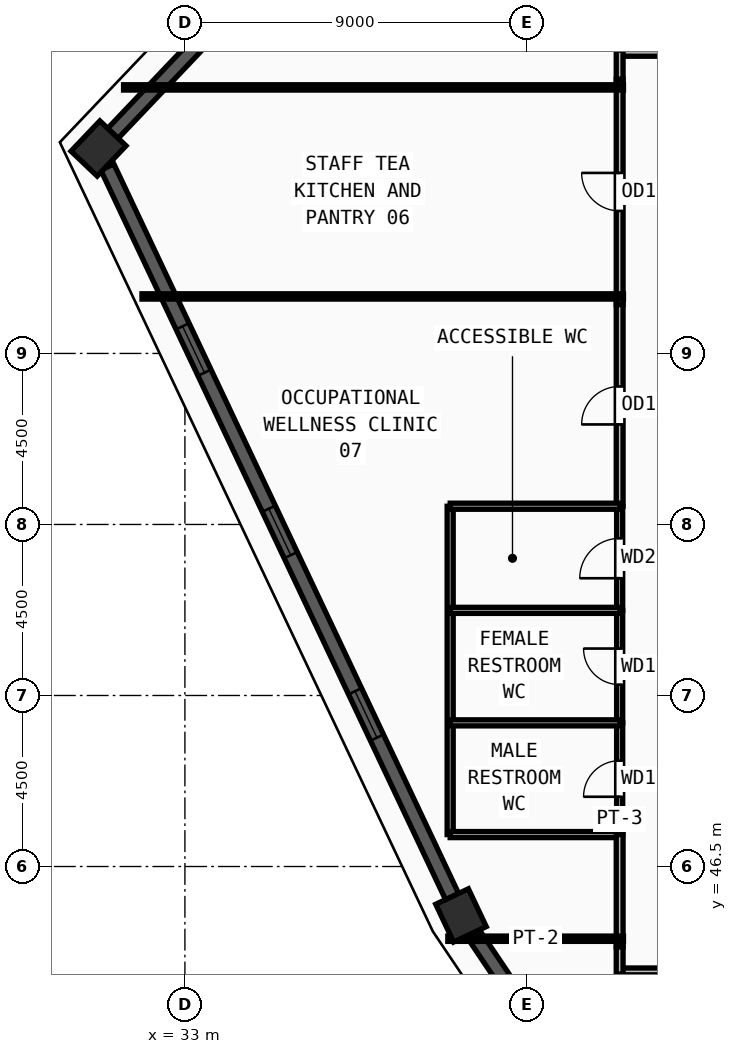
"""IFC4 building model, lengths in metres.
Left out: names, types, materials, properties, quantities, classifications, styles, units other than length and angle.
Written with IfcOpenShell. Run it as: python <this file> out.ifc"""

import sys

from ifc_helpers import new_model, si_unit, direction, frame, frame_2d, origin, origin_2d, place, context, subcontext, project, spatial, rectangle, extrude, source, transform, mapped, element, fill, save


model = new_model("IFC4")
c1 = context("Model", 3, precision=1e-05, world=origin(), true_north=direction((0.0, 1.0)))
c2 = subcontext(c1, "Body", "Model", "MODEL_VIEW")
j1 = project(units=[si_unit("LENGTHUNIT", "METRE"), si_unit("PLANEANGLEUNIT", "RADIAN")], contexts=[c1])
p1 = place(None, origin())
s1 = spatial("IfcSite", under=j1, at=p1, CompositionType="ELEMENT")
p2 = place(p1, origin())
s2 = spatial("IfcBuilding", under=s1, at=p2, CompositionType="ELEMENT")
p3 = place(p2, frame((0.0, 0.0, 328.5)))
s3 = spatial("IfcBuildingStorey", under=s2, at=p3, CompositionType="ELEMENT", Elevation=328.5)
m1 = source(origin(), c2, "Body", "SweptSolid", [
    extrude(rectangle(XDim=1.1, YDim=0.95, at=origin_2d()), origin(), (0.0, 0.0, 1.0), 3.75),
])
for number, where, z_axis, x_axis in (
    (1, (40.265, 45.213, 0.0), (0.0, 0.0, 1.0), (-0.427, 0.904, 0.0)),
    (2, (30.727, 65.393, 0.0), (0.0, 0.0, 1.0), (0.689, 0.724, 0.0)),
):
    element("IfcColumn", number, at=place(p3, frame(where, z_axis=z_axis, x_axis=x_axis)), inside=s3, PredefinedType="COLUMN", context=c2, shape_type="MappedRepresentation", body=[
        mapped(m1, transform((0.0, 0.0, 0.0), x_axis=(1.0, 0.0, 0.0), y_axis=(0.0, 1.0, 0.0), z_axis=(0.0, 0.0, 1.0), scale=1.0)),
    ])
p4 = place(p3, frame((33.737, 68.557, 0.0), z_axis=(0.0, 0.0, 1.0), x_axis=(-0.689248887434, -0.724524651872, 0.0)))
e3 = element("IfcWall", 3, at=p4, inside=s3, PredefinedType="SOLIDWALL", context=c2, shape_type="SweptSolid", body=[
    extrude(rectangle(XDim=3.827, YDim=0.38, at=frame_2d((1.914, 0.0))), origin(), (0.0, 0.0, 1.0), 3.57),
])
p5 = place(p3, frame((30.958, 64.905, 0.0), z_axis=(0.0, 0.0, 1.0), x_axis=(0.427288231304, -0.904115461315, 0.0)))
e4 = element("IfcWall", 4, at=p5, inside=s3, PredefinedType="SOLIDWALL", context=c2, shape_type="SweptSolid", body=[
    extrude(rectangle(XDim=21.241, YDim=0.38, at=frame_2d((10.62, 0.0))), origin(), (0.0, 0.0, 1.0), 3.57),
])
m2 = source(origin(), c2, "Body", "SweptSolid", [
    extrude(rectangle(XDim=1.35, YDim=1.85, at=frame_2d((0.675, 0.925))), frame((0.0, 0.2, 0.0), z_axis=(0.0, -1.0, 0.0), x_axis=(1.0, 0.0, 0.0)), (0.0, 0.0, 1.0), 0.4),
])
p6 = place(p5, frame((4.635, 0.0, 0.55)))
e5 = element("IfcOpeningElement", 5, at=p6, cuts=e4, PredefinedType="OPENING", context=c2, shape_type="MappedRepresentation", body=[
    mapped(m2, transform((0.0, 0.0, 0.0), x_axis=(1.0, 0.0, 0.0), y_axis=(0.0, 1.0, 0.0), z_axis=(0.0, 0.0, 1.0), scale=1.0)),
])
p7 = place(p5, frame((9.945, 0.0, 0.55)))
e6 = element("IfcOpeningElement", 6, at=p7, cuts=e4, PredefinedType="OPENING", context=c2, shape_type="MappedRepresentation", body=[
    mapped(m2, transform((0.0, 0.0, 0.0), x_axis=(1.0, 0.0, 0.0), y_axis=(0.0, 1.0, 0.0), z_axis=(0.0, 0.0, 1.0), scale=1.0)),
])
p8 = place(p5, frame((15.256, 0.0, 0.55)))
e7 = element("IfcOpeningElement", 7, at=p8, cuts=e4, PredefinedType="OPENING", context=c2, shape_type="MappedRepresentation", body=[
    mapped(m2, transform((0.0, 0.0, 0.0), x_axis=(1.0, 0.0, 0.0), y_axis=(0.0, 1.0, 0.0), z_axis=(0.0, 0.0, 1.0), scale=1.0)),
])
p9 = place(p3, frame((40.566, 44.765, 0.0), z_axis=(0.0, 0.0, 1.0), x_axis=(0.558170282959, -0.829726421913, 0.0)))
e8 = element("IfcWall", 8, at=p9, inside=s3, PredefinedType="SOLIDWALL", context=c2, shape_type="SweptSolid", body=[
    extrude(rectangle(XDim=25.747, YDim=0.38, at=frame_2d((12.874, 0.0))), origin(), (0.0, 0.0, 1.0), 3.57),
])
p10 = place(p9, frame((5.762, 0.0, 0.55)))
e9 = element("IfcOpeningElement", 9, at=p10, cuts=e8, PredefinedType="OPENING", context=c2, shape_type="MappedRepresentation", body=[
    mapped(m2, transform((0.0, 0.0, 0.0), x_axis=(1.0, 0.0, 0.0), y_axis=(0.0, 1.0, 0.0), z_axis=(0.0, 0.0, 1.0), scale=1.0)),
])
p11 = place(p9, frame((12.198, 0.0, 0.55)))
e10 = element("IfcOpeningElement", 10, at=p11, cuts=e8, PredefinedType="OPENING", context=c2, shape_type="MappedRepresentation", body=[
    mapped(m2, transform((0.0, 0.0, 0.0), x_axis=(1.0, 0.0, 0.0), y_axis=(0.0, 1.0, 0.0), z_axis=(0.0, 0.0, 1.0), scale=1.0)),
])
p12 = place(p9, frame((18.635, 0.0, 0.55)))
e11 = element("IfcOpeningElement", 11, at=p12, cuts=e8, PredefinedType="OPENING", context=c2, shape_type="MappedRepresentation", body=[
    mapped(m2, transform((0.0, 0.0, 0.0), x_axis=(1.0, 0.0, 0.0), y_axis=(0.0, 1.0, 0.0), z_axis=(0.0, 0.0, 1.0), scale=1.0)),
])
p13 = place(p3, frame((44.44, 47.34, 0.0), z_axis=(0.0, 0.0, 1.0), x_axis=(0.0, 1.0, 0.0)))
e12 = element("IfcWall", 12, at=p13, inside=s3, PredefinedType="PARTITIONING", context=c2, shape_type="SweptSolid", body=[
    extrude(rectangle(XDim=2.94, YDim=0.16, at=frame_2d((1.47, 0.0))), origin(), (0.0, 0.0, 1.0), 3.57),
])
m3 = source(origin(), c2, "Body", "SweptSolid", [
    extrude(rectangle(XDim=0.95, YDim=2.15, at=frame_2d((0.475, 1.075))), frame((0.0, 0.09, 0.0), z_axis=(0.0, -1.0, 0.0), x_axis=(1.0, 0.0, 0.0)), (0.0, 0.0, 1.0), 0.18),
])
p14 = place(p13, frame((0.995, 0.0, 0.0)))
e13 = element("IfcOpeningElement", 13, at=p14, cuts=e12, PredefinedType="OPENING", context=c2, shape_type="MappedRepresentation", body=[
    mapped(m3, transform((0.0, 0.0, 0.0), x_axis=(1.0, 0.0, 0.0), y_axis=(0.0, 1.0, 0.0), z_axis=(0.0, 0.0, 1.0), scale=1.0)),
])
p15 = place(p3, frame((44.44, 50.28, 0.0), z_axis=(0.0, 0.0, 1.0), x_axis=(0.0, 1.0, 0.0)))
e14 = element("IfcWall", 14, at=p15, inside=s3, PredefinedType="PARTITIONING", context=c2, shape_type="SweptSolid", body=[
    extrude(rectangle(XDim=2.96, YDim=0.16, at=frame_2d((1.48, 0.0))), origin(), (0.0, 0.0, 1.0), 3.57),
])
p16 = place(p15, frame((1.005, 0.0, 0.0)))
e15 = element("IfcOpeningElement", 15, at=p16, cuts=e14, PredefinedType="OPENING", context=c2, shape_type="MappedRepresentation", body=[
    mapped(m3, transform((0.0, 0.0, 0.0), x_axis=(1.0, 0.0, 0.0), y_axis=(0.0, 1.0, 0.0), z_axis=(0.0, 0.0, 1.0), scale=1.0)),
])
p17 = place(p3, frame((44.44, 53.24, 0.0), z_axis=(0.0, 0.0, 1.0), x_axis=(0.0, 1.0, 0.0)))
e16 = element("IfcWall", 16, at=p17, inside=s3, PredefinedType="PARTITIONING", context=c2, shape_type="SweptSolid", body=[
    extrude(rectangle(XDim=2.74, YDim=0.16, at=frame_2d((1.37, 0.0))), origin(), (0.0, 0.0, 1.0), 3.261),
])
m4 = source(origin(), c2, "Body", "SweptSolid", [
    extrude(rectangle(XDim=1.05, YDim=2.15, at=frame_2d((0.525, 1.075))), frame((0.0, 0.09, 0.0), z_axis=(0.0, -1.0, 0.0), x_axis=(1.0, 0.0, 0.0)), (0.0, 0.0, 1.0), 0.18),
])
p18 = place(p17, frame((0.845, 0.0, 0.0)))
e17 = element("IfcOpeningElement", 17, at=p18, cuts=e16, PredefinedType="OPENING", context=c2, shape_type="MappedRepresentation", body=[
    mapped(m4, transform((0.0, 0.0, 0.0), x_axis=(1.0, 0.0, 0.0), y_axis=(0.0, 1.0, 0.0), z_axis=(0.0, 0.0, 1.0), scale=1.0)),
])
p19 = place(p3, frame((44.37, 67.91, 0.0), z_axis=(0.0, 0.0, 1.0), x_axis=(1.0, 0.0, 0.0)))
e18 = element("IfcWall", 18, at=p19, inside=s3, PredefinedType="PARTITIONING", context=c2, shape_type="SweptSolid", body=[
    extrude(rectangle(XDim=7.64, YDim=0.18, at=frame_2d((3.82, 0.0))), origin(), (0.0, 0.0, 1.0), 3.57),
])
m5 = source(origin(), c2, "Body", "SweptSolid", [
    extrude(rectangle(XDim=1.5, YDim=2.2, at=frame_2d((0.75, 1.1))), frame((0.0, 0.1, 0.0), z_axis=(0.0, -1.0, 0.0), x_axis=(1.0, 0.0, 0.0)), (0.0, 0.0, 1.0), 0.2),
])
p20 = place(p19, frame((3.07, 0.0, 0.0)))
e19 = element("IfcOpeningElement", 19, at=p20, cuts=e18, PredefinedType="OPENING", context=c2, shape_type="MappedRepresentation", body=[
    mapped(m5, transform((0.0, 0.0, 0.0), x_axis=(1.0, 0.0, 0.0), y_axis=(0.0, 1.0, 0.0), z_axis=(0.0, 0.0, 1.0), scale=1.0)),
])
p21 = place(p3, frame((44.44, 61.285, 0.0), z_axis=(0.0, 0.0, 1.0), x_axis=(0.0, 1.0, 0.0)))
e20 = element("IfcWall", 20, at=p21, inside=s3, PredefinedType="PARTITIONING", context=c2, shape_type="SweptSolid", body=[
    extrude(rectangle(XDim=5.93, YDim=0.18, at=frame_2d((2.965, 0.0))), origin(), (0.0, 0.0, 1.0), 3.57),
])
m6 = source(origin(), c2, "Body", "SweptSolid", [
    extrude(rectangle(XDim=1.0, YDim=2.2, at=frame_2d((0.5, 1.1))), frame((0.0, 0.1, 0.0), z_axis=(0.0, -1.0, 0.0), x_axis=(1.0, 0.0, 0.0)), (0.0, 0.0, 1.0), 0.2),
])
p22 = place(p21, frame((2.465, 0.0, 0.0)))
e21 = element("IfcOpeningElement", 21, at=p22, cuts=e20, PredefinedType="OPENING", context=c2, shape_type="MappedRepresentation", body=[
    mapped(m6, transform((0.0, 0.0, 0.0), x_axis=(1.0, 0.0, 0.0), y_axis=(0.0, 1.0, 0.0), z_axis=(0.0, 0.0, 1.0), scale=1.0)),
])
p23 = place(p3, frame((44.44, 55.98, 0.0), z_axis=(0.0, 0.0, 1.0), x_axis=(0.0, 1.0, 0.0)))
e22 = element("IfcWall", 22, at=p23, inside=s3, PredefinedType="PARTITIONING", context=c2, shape_type="SweptSolid", body=[
    extrude(rectangle(XDim=5.305, YDim=0.18, at=frame_2d((2.652, 0.0))), origin(), (0.0, 0.0, 1.0), 3.57),
])
p24 = place(p23, frame((2.152, 0.0, 0.0)))
e23 = element("IfcOpeningElement", 23, at=p24, cuts=e22, PredefinedType="OPENING", context=c2, shape_type="MappedRepresentation", body=[
    mapped(m6, transform((0.0, 0.0, 0.0), x_axis=(1.0, 0.0, 0.0), y_axis=(0.0, 1.0, 0.0), z_axis=(0.0, 0.0, 1.0), scale=1.0)),
])
p25 = place(p3, frame((75.63, 43.74, 0.0), z_axis=(0.0, 0.0, 1.0), x_axis=(-1.0, 0.0, 0.0)))
e24 = element("IfcWall", 24, at=p25, inside=s3, PredefinedType="PARTITIONING", context=c2, shape_type="SweptSolid", body=[
    extrude(rectangle(XDim=31.26, YDim=0.18, at=frame_2d((15.63, 0.0))), origin(), (0.0, 0.0, 1.0), 3.57),
])
p26 = place(p25, frame((10.68, 0.0, 0.0)))
e25 = element("IfcOpeningElement", 25, at=p26, cuts=e24, PredefinedType="OPENING", context=c2, shape_type="MappedRepresentation", body=[
    mapped(m5, transform((0.0, 0.0, 0.0), x_axis=(1.0, 0.0, 0.0), y_axis=(0.0, 1.0, 0.0), z_axis=(0.0, 0.0, 1.0), scale=1.0)),
])
p27 = place(p3, frame((39.98, 47.34, 0.0), z_axis=(0.0, 0.0, 1.0), x_axis=(0.0, 1.0, 0.0)))
e26 = element("IfcWall", 26, at=p27, inside=s3, PredefinedType="PARTITIONING", context=c2, shape_type="SweptSolid", body=[
    extrude(rectangle(XDim=8.64, YDim=0.16, at=frame_2d((4.32, 0.0))), origin(), (0.0, 0.0, 1.0), 3.57),
])
for number, where, z_axis, x_axis in (
    (27, (39.98, 47.34, 0.0), (0.0, 0.0, 1.0), (1.0, 0.0, 0.0)),
    (28, (39.98, 50.28, 0.0), (0.0, 0.0, 1.0), (1.0, 0.0, 0.0)),
    (29, (39.98, 53.24, 0.0), (0.0, 0.0, 1.0), (1.0, 0.0, 0.0)),
    (30, (39.98, 55.98, 0.0), (0.0, 0.0, 1.0), (1.0, 0.0, 0.0)),
):
    element("IfcWall", number, at=place(p3, frame(where, z_axis=z_axis, x_axis=x_axis)), inside=s3, PredefinedType="PARTITIONING", context=c2, shape_type="SweptSolid", body=[
        extrude(rectangle(XDim=4.46, YDim=0.16, at=frame_2d((2.23, 0.0))), origin(), (0.0, 0.0, 1.0), 3.57),
    ])
p28 = place(p3, frame((44.44, 67.215, 0.0), z_axis=(0.0, 0.0, 1.0), x_axis=(0.0, 1.0, 0.0)))
e31 = element("IfcWall", 31, at=p28, inside=s3, PredefinedType="PARTITIONING", context=c2, shape_type="SweptSolid", body=[
    extrude(rectangle(XDim=0.765, YDim=0.18, at=frame_2d((0.382, 0.0))), origin(), (0.0, 0.0, 1.0), 3.57),
])
p29 = place(p3, frame((44.44, 44.385, 0.0), z_axis=(0.0, 0.0, 1.0), x_axis=(0.0, 1.0, 0.0)))
e32 = element("IfcWall", 32, at=p29, inside=s3, PredefinedType="PARTITIONING", context=c2, shape_type="SweptSolid", body=[
    extrude(rectangle(XDim=2.955, YDim=0.18, at=frame_2d((1.478, 0.0))), origin(), (0.0, 0.0, 1.0), 3.57),
])
p30 = place(p3, frame((44.44, 43.67, 0.0), z_axis=(0.0, 0.0, 1.0), x_axis=(0.0, 1.0, 0.0)))
e33 = element("IfcWall", 33, at=p30, inside=s3, PredefinedType="PARTITIONING", context=c2, shape_type="SweptSolid", body=[
    extrude(rectangle(XDim=0.715, YDim=0.18, at=frame_2d((0.357, 0.0))), origin(), (0.0, 0.0, 1.0), 3.57),
])
p31 = place(p3, frame((44.54, 44.6, 0.0), z_axis=(0.0, 0.0, 1.0), x_axis=(-1.0, 0.0, 0.0)))
e34 = element("IfcWall", 34, at=p31, inside=s3, PredefinedType="PARTITIONING", context=c2, shape_type="SweptSolid", body=[
    extrude(rectangle(XDim=4.622, YDim=0.14, at=frame_2d((2.311, 0.0))), origin(), (0.0, 0.0, 1.0), 3.57),
])
p32 = place(p3, frame((44.54, 61.5, 0.0), z_axis=(0.0, 0.0, 1.0), x_axis=(-1.0, 0.0, 0.0)))
e35 = element("IfcWall", 35, at=p32, inside=s3, PredefinedType="PARTITIONING", context=c2, shape_type="SweptSolid", body=[
    extrude(rectangle(XDim=12.67, YDim=0.14, at=frame_2d((6.335, 0.0))), origin(), (0.0, 0.0, 1.0), 3.57),
])
p33 = place(p3, frame((44.54, 67.0, 0.0), z_axis=(0.0, 0.0, 1.0), x_axis=(-1.0, 0.0, 0.0)))
e36 = element("IfcWall", 36, at=p33, inside=s3, PredefinedType="PARTITIONING", context=c2, shape_type="SweptSolid", body=[
    extrude(rectangle(XDim=13.154, YDim=0.14, at=frame_2d((6.577, 0.0))), origin(), (0.0, 0.0, 1.0), 3.57),
])
m7 = source(origin(), c2, "Body", "SweptSolid", [
    extrude(rectangle(XDim=1.35, YDim=1.85, at=frame_2d((0.675, 0.925))), frame((0.0, 0.03, 0.0), z_axis=(0.0, -1.0, 0.0), x_axis=(1.0, 0.0, 0.0)), (0.0, 0.0, 1.0), 0.06),
])
p34 = place(p6, origin())
e37 = element("IfcWindow", 37, at=p34, inside=s3, PartitioningType="SINGLE_PANEL", PredefinedType="WINDOW", context=c2, shape_type="MappedRepresentation", body=[
    mapped(m7, transform((0.0, 0.0, 0.0), x_axis=(1.0, 0.0, 0.0), y_axis=(0.0, 1.0, 0.0), z_axis=(0.0, 0.0, 1.0), scale=1.0)),
])
fill(e5, e37)
p35 = place(p7, origin())
e38 = element("IfcWindow", 38, at=p35, inside=s3, PartitioningType="SINGLE_PANEL", PredefinedType="WINDOW", context=c2, shape_type="MappedRepresentation", body=[
    mapped(m7, transform((0.0, 0.0, 0.0), x_axis=(1.0, 0.0, 0.0), y_axis=(0.0, 1.0, 0.0), z_axis=(0.0, 0.0, 1.0), scale=1.0)),
])
fill(e6, e38)
p36 = place(p8, origin())
e39 = element("IfcWindow", 39, at=p36, inside=s3, PartitioningType="SINGLE_PANEL", PredefinedType="WINDOW", context=c2, shape_type="MappedRepresentation", body=[
    mapped(m7, transform((0.0, 0.0, 0.0), x_axis=(1.0, 0.0, 0.0), y_axis=(0.0, 1.0, 0.0), z_axis=(0.0, 0.0, 1.0), scale=1.0)),
])
fill(e7, e39)
m8 = source(origin(), c2, "Body", "SweptSolid", [
    extrude(rectangle(XDim=0.95, YDim=2.15, at=frame_2d((0.475, 1.075))), frame((0.0, 0.025, 0.0), z_axis=(0.0, -1.0, 0.0), x_axis=(1.0, 0.0, 0.0)), (0.0, 0.0, 1.0), 0.05),
])
p37 = place(p14, origin())
e40 = element("IfcDoor", 40, at=p37, inside=s3, OperationType="SINGLE_SWING_LEFT", PredefinedType="DOOR", context=c2, shape_type="MappedRepresentation", body=[
    mapped(m8, transform((0.0, 0.0, 0.0), x_axis=(1.0, 0.0, 0.0), y_axis=(0.0, 1.0, 0.0), z_axis=(0.0, 0.0, 1.0), scale=1.0)),
])
fill(e13, e40)
p38 = place(p16, origin())
e41 = element("IfcDoor", 41, at=p38, inside=s3, OperationType="SINGLE_SWING_RIGHT", PredefinedType="DOOR", context=c2, shape_type="MappedRepresentation", body=[
    mapped(m8, transform((0.0, 0.0, 0.0), x_axis=(1.0, 0.0, 0.0), y_axis=(0.0, 1.0, 0.0), z_axis=(0.0, 0.0, 1.0), scale=1.0)),
])
fill(e15, e41)
m9 = source(origin(), c2, "Body", "SweptSolid", [
    extrude(rectangle(XDim=1.05, YDim=2.15, at=frame_2d((0.525, 1.075))), frame((0.0, 0.025, 0.0), z_axis=(0.0, -1.0, 0.0), x_axis=(1.0, 0.0, 0.0)), (0.0, 0.0, 1.0), 0.05),
])
p39 = place(p18, origin())
e42 = element("IfcDoor", 42, at=p39, inside=s3, OperationType="SINGLE_SWING_LEFT", PredefinedType="DOOR", context=c2, shape_type="MappedRepresentation", body=[
    mapped(m9, transform((0.0, 0.0, 0.0), x_axis=(1.0, 0.0, 0.0), y_axis=(0.0, 1.0, 0.0), z_axis=(0.0, 0.0, 1.0), scale=1.0)),
])
fill(e17, e42)
m10 = source(origin(), c2, "Body", "SweptSolid", [
    extrude(rectangle(XDim=1.0, YDim=2.2, at=frame_2d((0.5, 1.1))), frame((0.0, 0.025, 0.0), z_axis=(0.0, -1.0, 0.0), x_axis=(1.0, 0.0, 0.0)), (0.0, 0.0, 1.0), 0.05),
])
p40 = place(p22, origin())
e43 = element("IfcDoor", 43, at=p40, inside=s3, OperationType="SINGLE_SWING_RIGHT", PredefinedType="DOOR", context=c2, shape_type="MappedRepresentation", body=[
    mapped(m10, transform((0.0, 0.0, 0.0), x_axis=(1.0, 0.0, 0.0), y_axis=(0.0, 1.0, 0.0), z_axis=(0.0, 0.0, 1.0), scale=1.0)),
])
fill(e21, e43)
p41 = place(p24, origin())
e44 = element("IfcDoor", 44, at=p41, inside=s3, OperationType="SINGLE_SWING_LEFT", PredefinedType="DOOR", context=c2, shape_type="MappedRepresentation", body=[
    mapped(m10, transform((0.0, 0.0, 0.0), x_axis=(1.0, 0.0, 0.0), y_axis=(0.0, 1.0, 0.0), z_axis=(0.0, 0.0, 1.0), scale=1.0)),
])
fill(e23, e44)
save(model, sys.argv[1])
